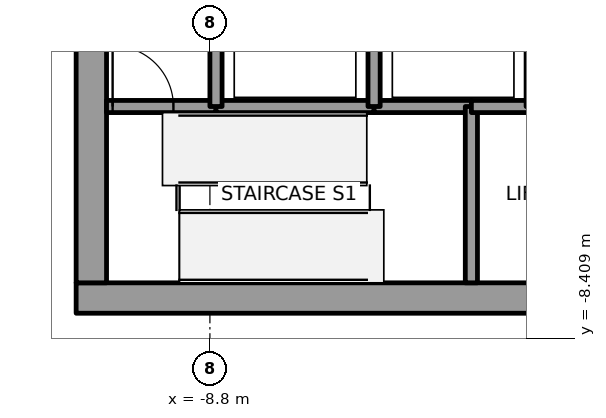
"""IFC4 building model, lengths in metres.
Left out: names, types, materials, properties, quantities, classifications, styles, units other than length and angle.
Written with IfcOpenShell. Run it as: python <this file> out.ifc"""

import sys

from ifc_helpers import new_model, si_unit, direction, frame, frame_2d, origin, place, context, subcontext, project, spatial, rectangle, extrude, element, fill, save


model = new_model("IFC4")
c1 = context("Model", 3, precision=1e-05, world=origin(), true_north=direction((0.0, 1.0)))
c2 = subcontext(c1, "Body", "Model", "MODEL_VIEW")
j1 = project(units=[si_unit("LENGTHUNIT", "METRE"), si_unit("PLANEANGLEUNIT", "RADIAN")], contexts=[c1])
p1 = place(None, origin())
s1 = spatial("IfcSite", under=j1, at=p1, CompositionType="ELEMENT")
p2 = place(p1, origin())
s2 = spatial("IfcBuilding", under=s1, at=p2, CompositionType="ELEMENT")
p3 = place(p2, frame((0.0, 0.0, 247.0)))
s3 = spatial("IfcBuildingStorey", under=s2, at=p3, CompositionType="ELEMENT", Elevation=247.0)
p4 = place(p3, frame((-11.0, -7.75, 0.0), z_axis=(0.0, 0.0, 1.0), x_axis=(1.0, 0.0, 0.0)))
e1 = element("IfcWall", 1, at=p4, inside=s3, PredefinedType="SHEAR", context=c2, shape_type="SweptSolid", body=[
    extrude(rectangle(XDim=22.0, YDim=0.5, at=frame_2d((11.0, 0.0))), origin(), (0.0, 0.0, 1.0), 4.0),
])
p5 = place(p4, frame((10.45, 0.0, 0.0)))
e2 = element("IfcOpeningElement", 2, at=p5, cuts=e1, PredefinedType="OPENING", context=c2, shape_type="SweptSolid", body=[
    extrude(rectangle(XDim=1.1, YDim=2.1, at=frame_2d((0.55, 1.05))), frame((0.0, 0.25, 0.0), z_axis=(0.0, -1.0, 0.0), x_axis=(1.0, 0.0, 0.0)), (0.0, 0.0, 1.0), 0.5),
])
p6 = place(p3, frame((-10.75, -7.5, 0.0), z_axis=(0.0, 0.0, 1.0), x_axis=(0.0, 1.0, 0.0)))
e3 = element("IfcWall", 3, at=p6, inside=s3, PredefinedType="SHEAR", context=c2, shape_type="SweptSolid", body=[
    extrude(rectangle(XDim=15.0, YDim=0.5, at=frame_2d((7.5, 0.0))), origin(), (0.0, 0.0, 1.0), 4.0),
])
p7 = place(p6, frame((6.6, 0.0, 0.0)))
e4 = element("IfcOpeningElement", 4, at=p7, cuts=e3, PredefinedType="OPENING", context=c2, shape_type="SweptSolid", body=[
    extrude(rectangle(XDim=1.8, YDim=2.1, at=frame_2d((0.9, 1.05))), frame((0.0, 0.25, 0.0), z_axis=(0.0, -1.0, 0.0), x_axis=(1.0, 0.0, 0.0)), (0.0, 0.0, 1.0), 0.5),
])
p8 = place(p3, frame((-10.5, -4.6, 0.0), z_axis=(0.0, 0.0, 1.0), x_axis=(1.0, 0.0, 0.0)))
e5 = element("IfcWall", 5, at=p8, inside=s3, PredefinedType="SOLIDWALL", context=c2, shape_type="SweptSolid", body=[
    extrude(rectangle(XDim=1.8, YDim=0.2, at=frame_2d((0.9, 0.0))), origin(), (0.0, 0.0, 1.0), 3.85),
])
p9 = place(p8, frame((0.1, 0.0, 0.0)))
e6 = element("IfcOpeningElement", 6, at=p9, cuts=e5, PredefinedType="OPENING", context=c2, shape_type="SweptSolid", body=[
    extrude(rectangle(XDim=1.0, YDim=2.1, at=frame_2d((0.5, 1.05))), frame((0.0, 0.1, 0.0), z_axis=(0.0, -1.0, 0.0), x_axis=(1.0, 0.0, 0.0)), (0.0, 0.0, 1.0), 0.2),
])
p10 = place(p3, frame((-8.7, -4.6, 0.0), z_axis=(0.0, 0.0, 1.0), x_axis=(1.0, 0.0, 0.0)))
e7 = element("IfcWall", 7, at=p10, inside=s3, PredefinedType="SOLIDWALL", context=c2, shape_type="SweptSolid", body=[
    extrude(rectangle(XDim=2.6, YDim=0.2, at=frame_2d((1.3, 0.0))), origin(), (0.0, 0.0, 1.0), 3.85),
])
p11 = place(p3, frame((-8.7, -4.6, 0.0), z_axis=(0.0, 0.0, 1.0), x_axis=(0.0, 1.0, 0.0)))
e8 = element("IfcWall", 8, at=p11, inside=s3, PredefinedType="SOLIDWALL", context=c2, shape_type="SweptSolid", body=[
    extrude(rectangle(XDim=2.8, YDim=0.2, at=frame_2d((1.4, 0.0))), origin(), (0.0, 0.0, 1.0), 3.85),
])
p12 = place(p3, frame((-6.1, -4.6, 0.0), z_axis=(0.0, 0.0, 1.0), x_axis=(1.0, 0.0, 0.0)))
e9 = element("IfcWall", 9, at=p12, inside=s3, PredefinedType="SOLIDWALL", context=c2, shape_type="SweptSolid", body=[
    extrude(rectangle(XDim=1.6, YDim=0.2, at=frame_2d((0.8, 0.0))), origin(), (0.0, 0.0, 1.0), 3.85),
])
p13 = place(p3, frame((-6.1, -4.6, 0.0), z_axis=(0.0, 0.0, 1.0), x_axis=(0.0, 1.0, 0.0)))
e10 = element("IfcWall", 10, at=p13, inside=s3, PredefinedType="SOLIDWALL", context=c2, shape_type="SweptSolid", body=[
    extrude(rectangle(XDim=2.8, YDim=0.2, at=frame_2d((1.4, 0.0))), origin(), (0.0, 0.0, 1.0), 3.85),
])
p14 = place(p3, frame((-4.5, -4.6, 0.0), z_axis=(0.0, 0.0, 1.0), x_axis=(0.0, -1.0, 0.0)))
e11 = element("IfcWall", 11, at=p14, inside=s3, PredefinedType="SOLIDWALL", context=c2, shape_type="SweptSolid", body=[
    extrude(rectangle(XDim=2.9, YDim=0.2, at=frame_2d((1.45, 0.0))), origin(), (0.0, 0.0, 1.0), 3.85),
])
p15 = place(p3, frame((-4.5, -4.6, 0.0), z_axis=(0.0, 0.0, 1.0), x_axis=(1.0, 0.0, 0.0)))
e12 = element("IfcWall", 12, at=p15, inside=s3, PredefinedType="SOLIDWALL", context=c2, shape_type="SweptSolid", body=[
    extrude(rectangle(XDim=1.0, YDim=0.2, at=frame_2d((0.5, 0.0))), origin(), (0.0, 0.0, 1.0), 3.85),
])
p16 = place(p9, origin())
e13 = element("IfcDoor", 13, at=p16, inside=s3, OperationType="SINGLE_SWING_LEFT", PredefinedType="DOOR", context=c2, shape_type="SweptSolid", body=[
    extrude(rectangle(XDim=1.0, YDim=2.1, at=frame_2d((0.5, 1.05))), frame((0.0, 0.025, 0.0), z_axis=(0.0, -1.0, 0.0), x_axis=(1.0, 0.0, 0.0)), (0.0, 0.0, 1.0), 0.05),
])
fill(e6, e13)
save(model, sys.argv[1])
